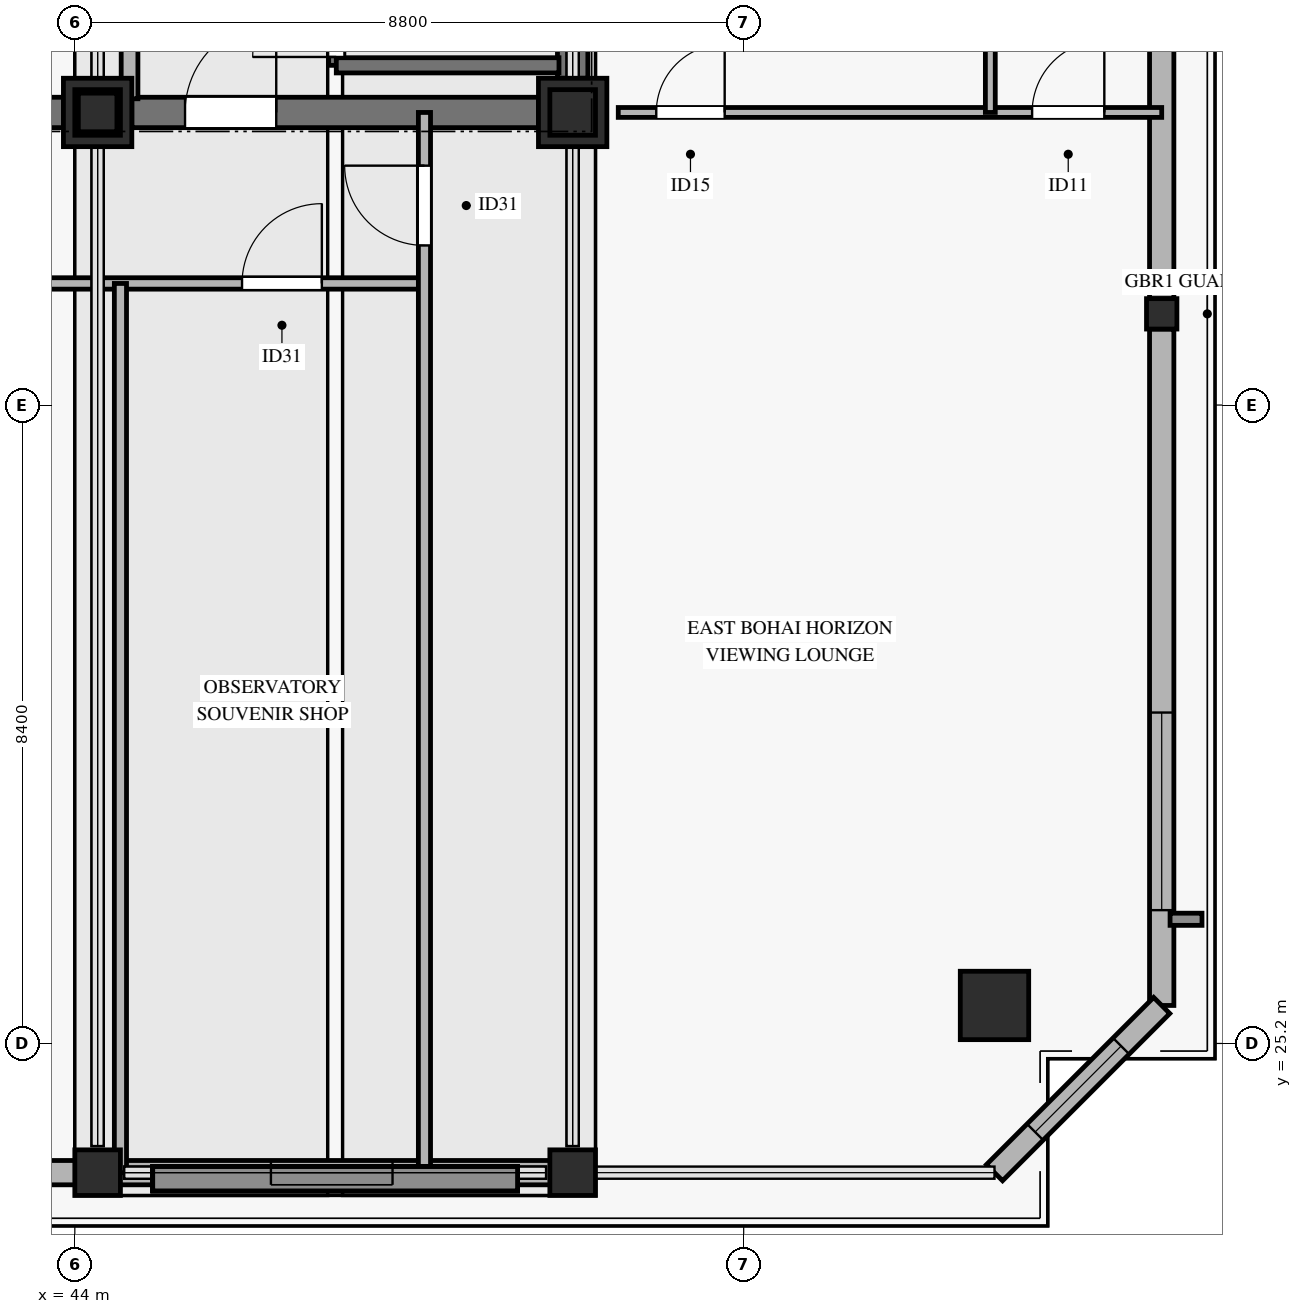
"""IFC4 building model, lengths in metres.
Left out: names, types, materials, properties, quantities, classifications, styles, units other than length and angle.
Written with IfcOpenShell. Run it as: python <this file> out.ifc"""

import sys

from ifc_helpers import new_model, si_unit, direction, frame, frame_2d, origin, origin_2d, place, context, subcontext, project, spatial, rectangle, hollow_rectangle, hollow_circle, extrude, source, transform, mapped, element, fill, save


model = new_model("IFC4")
c1 = context("Model", 3, precision=1e-05, world=origin(), true_north=direction((0.0, 1.0)))
c2 = subcontext(c1, "Body", "Model", "MODEL_VIEW")
j1 = project(units=[si_unit("LENGTHUNIT", "METRE"), si_unit("PLANEANGLEUNIT", "RADIAN")], contexts=[c1])
p1 = place(None, origin())
s1 = spatial("IfcSite", under=j1, at=p1, CompositionType="ELEMENT")
p2 = place(p1, origin())
s2 = spatial("IfcBuilding", under=s1, at=p2, CompositionType="ELEMENT")
p3 = place(p2, frame((0.0, 0.0, 352.7)))
s3 = spatial("IfcBuildingStorey", under=s2, at=p3, CompositionType="ELEMENT", Elevation=352.7)
m1 = source(origin(), c2, "Body", "SweptSolid", [
    extrude(rectangle(XDim=0.9, YDim=0.9, at=origin_2d()), origin(), (0.0, 0.0, 1.0), 6.16),
])
for number, where, z_axis, x_axis in (
    (1, (44.3, 37.45, 0.0), (0.0, 0.0, 1.0), (1.0, 0.0, 0.0)),
    (2, (50.55, 37.45, 0.0), (0.0, 0.0, 1.0), (1.0, 0.0, 0.0)),
):
    element("IfcColumn", number, at=place(p3, frame(where, z_axis=z_axis, x_axis=x_axis)), inside=s3, PredefinedType="PILASTER", context=c2, shape_type="MappedRepresentation", body=[
        mapped(m1, transform((0.0, 0.0, 0.0), x_axis=(1.0, 0.0, 0.0), y_axis=(0.0, 1.0, 0.0), z_axis=(0.0, 0.0, 1.0), scale=1.0)),
    ])
p4 = place(p3, frame((36.05, 37.45, 0.0), z_axis=(0.0, 0.0, 1.0), x_axis=(1.0, 0.0, 0.0)))
e3 = element("IfcWall", 3, at=p4, inside=s3, PredefinedType="SHEAR", context=c2, shape_type="SweptSolid", body=[
    extrude(rectangle(XDim=7.8, YDim=0.4, at=frame_2d((3.9, 0.0))), origin(), (0.0, 0.0, 1.0), 6.16),
])
p5 = place(p3, frame((44.75, 37.45, 0.0), z_axis=(0.0, 0.0, 1.0), x_axis=(1.0, 0.0, 0.0)))
e4 = element("IfcWall", 4, at=p5, inside=s3, PredefinedType="SHEAR", context=c2, shape_type="SweptSolid", body=[
    extrude(rectangle(XDim=5.35, YDim=0.4, at=frame_2d((2.675, 0.0))), origin(), (0.0, 0.0, 1.0), 6.16),
])
p6 = place(p5, frame((0.7, 0.0, 0.0)))
e5 = element("IfcOpeningElement", 5, at=p6, cuts=e4, PredefinedType="OPENING", context=c2, shape_type="SweptSolid", body=[
    extrude(rectangle(XDim=1.2, YDim=2.15, at=frame_2d((0.6, 1.075))), frame((0.0, 0.21, 0.0), z_axis=(0.0, -1.0, 0.0), x_axis=(1.0, 0.0, 0.0)), (0.0, 0.0, 1.0), 0.42),
])
p7 = place(p3, frame((50.55, 37.9, 0.0), z_axis=(0.0, 0.0, 1.0), x_axis=(0.0, 1.0, 0.0)))
e6 = element("IfcWall", 6, at=p7, inside=s3, PredefinedType="SHEAR", context=c2, shape_type="SweptSolid", body=[
    extrude(rectangle(XDim=8.2, YDim=0.4, at=frame_2d((4.1, 0.0))), origin(), (0.0, 0.0, 1.0), 6.16),
])
m2 = source(origin(), c2, "Body", "SweptSolid", [
    extrude(hollow_rectangle(XDim=0.9, YDim=0.9, WallThickness=0.04, at=origin_2d()), origin(), (0.0, 0.0, 1.0), 6.16),
])
p8 = place(p3, frame((56.1, 25.7, 0.0), z_axis=(0.0, 0.0, 1.0), x_axis=(1.0, 0.0, 0.0)))
e7 = element("IfcColumn", 7, at=p8, inside=s3, PredefinedType="COLUMN", context=c2, shape_type="MappedRepresentation", body=[
    mapped(m2, transform((0.0, 0.0, 0.0), x_axis=(1.0, 0.0, 0.0), y_axis=(0.0, 1.0, 0.0), z_axis=(0.0, 0.0, 1.0), scale=1.0)),
])
m3 = source(origin(), c2, "Body", "SweptSolid", [
    extrude(hollow_rectangle(XDim=0.4, YDim=0.4, WallThickness=0.02, at=origin_2d()), origin(), (0.0, 0.0, 1.0), 6.16),
])
for number, where, z_axis, x_axis in (
    (8, (44.3, 23.5, 0.0), (0.0, 0.0, 1.0), (1.0, 0.0, 0.0)),
    (9, (50.55, 23.5, 0.0), (0.0, 0.0, 1.0), (1.0, 0.0, 0.0)),
    (10, (58.3, 34.8, 0.0), (0.0, 0.0, 1.0), (1.0, 0.0, 0.0)),
):
    element("IfcColumn", number, at=place(p3, frame(where, z_axis=z_axis, x_axis=x_axis)), inside=s3, PredefinedType="COLUMN", context=c2, shape_type="MappedRepresentation", body=[
        mapped(m3, transform((0.0, 0.0, 0.0), x_axis=(1.0, 0.0, 0.0), y_axis=(0.0, 1.0, 0.0), z_axis=(0.0, 0.0, 1.0), scale=1.0)),
    ])
m4 = source(origin(), c2, "Body", "SweptSolid", [
    extrude(hollow_rectangle(XDim=0.6, YDim=0.6, WallThickness=0.028, at=origin_2d()), origin(), (0.0, 0.0, 1.0), 32.096),
])
for number, where, z_axis, x_axis in (
    (11, (44.3, 23.5, 6.4), (0.0, 0.0, 1.0), (1.0, 0.0, 0.0)),
    (12, (50.55, 23.5, 6.4), (0.0, 0.0, 1.0), (1.0, 0.0, 0.0)),
    (13, (50.55, 37.45, 6.4), (0.0, 0.0, 1.0), (1.0, 0.0, 0.0)),
    (14, (44.3, 37.45, 6.4), (0.0, 0.0, 1.0), (1.0, 0.0, 0.0)),
):
    element("IfcColumn", number, at=place(p3, frame(where, z_axis=z_axis, x_axis=x_axis)), inside=s3, PredefinedType="COLUMN", context=c2, shape_type="MappedRepresentation", body=[
        mapped(m4, transform((0.0, 0.0, 0.0), x_axis=(1.0, 0.0, 0.0), y_axis=(0.0, 1.0, 0.0), z_axis=(0.0, 0.0, 1.0), scale=1.0)),
    ])
m5 = source(origin(), c2, "Body", "SweptSolid", [
    extrude(hollow_circle(Radius=0.254, WallThickness=0.024, at=origin_2d()), origin(), (0.0, 0.0, 1.0), 1.704),
])
p9 = place(p3, frame((44.3, 37.45, 38.496), z_axis=(0.0, 0.0, 1.0), x_axis=(1.0, 0.0, 0.0)))
e15 = element("IfcColumn", 15, at=p9, inside=s3, PredefinedType="COLUMN", context=c2, shape_type="MappedRepresentation", body=[
    mapped(m5, transform((0.0, 0.0, 0.0), x_axis=(1.0, 0.0, 0.0), y_axis=(0.0, 1.0, 0.0), z_axis=(0.0, 0.0, 1.0), scale=1.0)),
])
p10 = place(p3, frame((37.75, 23.5, 0.0), z_axis=(0.0, 0.0, 1.0), x_axis=(1.0, 0.0, 0.0)))
e16 = element("IfcWall", 16, at=p10, inside=s3, PredefinedType="SOLIDWALL", context=c2, shape_type="SweptSolid", body=[
    extrude(rectangle(XDim=6.35, YDim=0.32, at=frame_2d((3.175, 0.0))), origin(), (0.0, 0.0, 1.0), 3.535),
])
p11 = place(p3, frame((44.5, 23.5, 0.0), z_axis=(0.0, 0.0, 1.0), x_axis=(1.0, 0.0, 0.0)))
e17 = element("IfcWall", 17, at=p11, inside=s3, PredefinedType="SOLIDWALL", context=c2, shape_type="SweptSolid", body=[
    extrude(rectangle(XDim=5.85, YDim=0.32, at=frame_2d((2.925, 0.0))), origin(), (0.0, 0.0, 1.0), 5.79),
])
p12 = place(p11, frame((2.08, 0.0, 0.45)))
e18 = element("IfcOpeningElement", 18, at=p12, cuts=e17, PredefinedType="OPENING", context=c2, shape_type="SweptSolid", body=[
    extrude(rectangle(XDim=1.6, YDim=2.0, at=frame_2d((0.8, 1.0))), frame((0.0, 0.17, 0.0), z_axis=(0.0, -1.0, 0.0), x_axis=(1.0, 0.0, 0.0)), (0.0, 0.0, 1.0), 0.34),
])
p13 = place(p3, frame((58.3, 25.7, 0.0), z_axis=(0.0, 0.0, 1.0), x_axis=(0.0, 1.0, 0.0)))
e19 = element("IfcWall", 19, at=p13, inside=s3, PredefinedType="SOLIDWALL", context=c2, shape_type="SweptSolid", body=[
    extrude(rectangle(XDim=8.9, YDim=0.32, at=frame_2d((4.45, 0.0))), origin(), (0.0, 0.0, 1.0), 5.79),
])
p14 = place(p13, frame((1.254, 0.0, 0.45)))
e20 = element("IfcOpeningElement", 20, at=p14, cuts=e19, PredefinedType="OPENING", context=c2, shape_type="SweptSolid", body=[
    extrude(rectangle(XDim=2.6, YDim=2.4, at=frame_2d((1.3, 1.2))), frame((0.0, 0.17, 0.0), z_axis=(0.0, -1.0, 0.0), x_axis=(1.0, 0.0, 0.0)), (0.0, 0.0, 1.0), 0.34),
])
p15 = place(p3, frame((58.3, 35.0, 0.0), z_axis=(0.0, 0.0, 1.0), x_axis=(0.0, 1.0, 0.0)))
e21 = element("IfcWall", 21, at=p15, inside=s3, PredefinedType="SOLIDWALL", context=c2, shape_type="SweptSolid", body=[
    extrude(rectangle(XDim=8.9, YDim=0.32, at=frame_2d((4.45, 0.0))), origin(), (0.0, 0.0, 1.0), 5.79),
])
p16 = place(p3, frame((56.1, 23.5, 0.0), z_axis=(0.0, 0.0, 1.0), x_axis=(0.707106781187, 0.707106781187, 0.0)))
e22 = element("IfcWall", 22, at=p16, inside=s3, PredefinedType="SOLIDWALL", context=c2, shape_type="SweptSolid", body=[
    extrude(rectangle(XDim=3.111, YDim=0.3, at=frame_2d((1.556, 0.0))), origin(), (0.0, 0.0, 1.0), 5.79),
])
p17 = place(p16, frame((0.756, 0.0, 0.45)))
e23 = element("IfcOpeningElement", 23, at=p17, cuts=e22, PredefinedType="OPENING", context=c2, shape_type="SweptSolid", body=[
    extrude(rectangle(XDim=1.6, YDim=2.0, at=frame_2d((0.8, 1.0))), frame((0.0, 0.16, 0.0), z_axis=(0.0, -1.0, 0.0), x_axis=(1.0, 0.0, 0.0)), (0.0, 0.0, 1.0), 0.32),
])
p18 = place(p3, frame((47.44, 38.07, 0.0), z_axis=(0.0, 0.0, 1.0), x_axis=(0.0, 1.0, 0.0)))
e24 = element("IfcWall", 24, at=p18, inside=s3, PredefinedType="SOLIDWALL", context=c2, shape_type="SweptSolid", body=[
    extrude(rectangle(XDim=7.25, YDim=0.2, at=frame_2d((3.625, 0.0))), origin(), (0.0, 0.0, 1.0), 6.4),
])
p19 = place(p18, frame((0.11, 0.0, 0.0)))
e25 = element("IfcOpeningElement", 25, at=p19, cuts=e24, PredefinedType="OPENING", context=c2, shape_type="SweptSolid", body=[
    extrude(rectangle(XDim=1.1, YDim=2.15, at=frame_2d((0.55, 1.075))), frame((0.0, 0.11, 0.0), z_axis=(0.0, -1.0, 0.0), x_axis=(1.0, 0.0, 0.0)), (0.0, 0.0, 1.0), 0.22),
])
p20 = place(p3, frame((47.44, 38.07, 0.0), z_axis=(0.0, 0.0, 1.0), x_axis=(1.0, 0.0, 0.0)))
e26 = element("IfcWall", 26, at=p20, inside=s3, PredefinedType="SOLIDWALL", context=c2, shape_type="SweptSolid", body=[
    extrude(rectangle(XDim=2.93, YDim=0.2, at=frame_2d((1.465, 0.0))), origin(), (0.0, 0.0, 1.0), 6.4),
])
p21 = place(p3, frame((44.72, 37.63, 0.0), z_axis=(0.0, 0.0, 1.0), x_axis=(0.0, 1.0, 0.0)))
e27 = element("IfcWall", 27, at=p21, inside=s3, PredefinedType="SOLIDWALL", context=c2, shape_type="SweptSolid", body=[
    extrude(rectangle(XDim=7.59, YDim=0.22, at=frame_2d((3.795, 0.0))), origin(), (0.0, 0.0, 1.0), 6.16),
])
p22 = place(p3, frame((22.6, 35.2, 0.0), z_axis=(0.0, 0.0, 1.0), x_axis=(1.0, 0.0, 0.0)))
e28 = element("IfcWall", 28, at=p22, inside=s3, PredefinedType="PARTITIONING", context=c2, shape_type="SweptSolid", body=[
    extrude(rectangle(XDim=26.0, YDim=0.15, at=frame_2d((13.0, 0.0))), origin(), (0.0, 0.0, 1.0), 3.535),
])
p23 = place(p22, frame((3.28, 0.0, 0.0)))
e29 = element("IfcOpeningElement", 29, at=p23, cuts=e28, PredefinedType="OPENING", context=c2, shape_type="SweptSolid", body=[
    extrude(rectangle(XDim=1.05, YDim=2.15, at=frame_2d((0.525, 1.075))), frame((0.0, 0.085, 0.0), z_axis=(0.0, -1.0, 0.0), x_axis=(1.0, 0.0, 0.0)), (0.0, 0.0, 1.0), 0.17),
])
p24 = place(p22, frame((11.94, 0.0, 0.0)))
e30 = element("IfcOpeningElement", 30, at=p24, cuts=e28, PredefinedType="OPENING", context=c2, shape_type="SweptSolid", body=[
    extrude(rectangle(XDim=1.05, YDim=2.15, at=frame_2d((0.525, 1.075))), frame((0.0, 0.085, 0.0), z_axis=(0.0, -1.0, 0.0), x_axis=(1.0, 0.0, 0.0)), (0.0, 0.0, 1.0), 0.17),
])
p25 = place(p22, frame((19.08, 0.0, 0.0)))
e31 = element("IfcOpeningElement", 31, at=p25, cuts=e28, PredefinedType="OPENING", context=c2, shape_type="SweptSolid", body=[
    extrude(rectangle(XDim=1.05, YDim=2.15, at=frame_2d((0.525, 1.075))), frame((0.0, 0.085, 0.0), z_axis=(0.0, -1.0, 0.0), x_axis=(1.0, 0.0, 0.0)), (0.0, 0.0, 1.0), 0.17),
])
p26 = place(p22, frame((23.6, 0.0, 0.0)))
e32 = element("IfcOpeningElement", 32, at=p26, cuts=e28, PredefinedType="OPENING", context=c2, shape_type="SweptSolid", body=[
    extrude(rectangle(XDim=1.05, YDim=2.15, at=frame_2d((0.525, 1.075))), frame((0.0, 0.085, 0.0), z_axis=(0.0, -1.0, 0.0), x_axis=(1.0, 0.0, 0.0)), (0.0, 0.0, 1.0), 0.17),
])
p27 = place(p3, frame((48.6, 23.5, 0.0), z_axis=(0.0, 0.0, 1.0), x_axis=(0.0, 1.0, 0.0)))
e33 = element("IfcWall", 33, at=p27, inside=s3, PredefinedType="PARTITIONING", context=c2, shape_type="SweptSolid", body=[
    extrude(rectangle(XDim=13.95, YDim=0.16, at=frame_2d((6.975, 0.0))), origin(), (0.0, 0.0, 1.0), 5.745),
])
p28 = place(p27, frame((12.2, 0.0, 0.0)))
e34 = element("IfcOpeningElement", 34, at=p28, cuts=e33, PredefinedType="OPENING", context=c2, shape_type="SweptSolid", body=[
    extrude(rectangle(XDim=1.05, YDim=2.15, at=frame_2d((0.525, 1.075))), frame((0.0, 0.09, 0.0), z_axis=(0.0, -1.0, 0.0), x_axis=(1.0, 0.0, 0.0)), (0.0, 0.0, 1.0), 0.18),
])
p29 = place(p3, frame((44.6, 23.5, 0.0), z_axis=(0.0, 0.0, 1.0), x_axis=(0.0, 1.0, 0.0)))
e35 = element("IfcWall", 35, at=p29, inside=s3, PredefinedType="PARTITIONING", context=c2, shape_type="SweptSolid", body=[
    extrude(rectangle(XDim=11.7, YDim=0.16, at=frame_2d((5.85, 0.0))), origin(), (0.0, 0.0, 1.0), 3.535),
])
p30 = place(p3, frame((51.15, 37.45, 0.0), z_axis=(0.0, 0.0, 1.0), x_axis=(1.0, 0.0, 0.0)))
e36 = element("IfcWall", 36, at=p30, inside=s3, PredefinedType="PARTITIONING", context=c2, shape_type="SweptSolid", body=[
    extrude(rectangle(XDim=7.15, YDim=0.13, at=frame_2d((3.575, 0.0))), origin(), (0.0, 0.0, 1.0), 5.795),
])
p31 = place(p30, frame((0.5, 0.0, 0.0)))
e37 = element("IfcOpeningElement", 37, at=p31, cuts=e36, PredefinedType="OPENING", context=c2, shape_type="SweptSolid", body=[
    extrude(rectangle(XDim=0.9, YDim=2.1, at=frame_2d((0.45, 1.05))), frame((0.0, 0.075, 0.0), z_axis=(0.0, -1.0, 0.0), x_axis=(1.0, 0.0, 0.0)), (0.0, 0.0, 1.0), 0.15),
])
p32 = place(p30, frame((5.445, 0.0, 0.0)))
e38 = element("IfcOpeningElement", 38, at=p32, cuts=e36, PredefinedType="OPENING", context=c2, shape_type="SweptSolid", body=[
    extrude(rectangle(XDim=0.95, YDim=2.1, at=frame_2d((0.475, 1.05))), frame((0.0, 0.075, 0.0), z_axis=(0.0, -1.0, 0.0), x_axis=(1.0, 0.0, 0.0)), (0.0, 0.0, 1.0), 0.15),
])
p33 = place(p3, frame((56.045, 37.45, 0.0), z_axis=(0.0, 0.0, 1.0), x_axis=(0.0, 1.0, 0.0)))
e39 = element("IfcWall", 39, at=p33, inside=s3, PredefinedType="PARTITIONING", context=c2, shape_type="SweptSolid", body=[
    extrude(rectangle(XDim=8.8, YDim=0.13, at=frame_2d((4.4, 0.0))), origin(), (0.0, 0.0, 1.0), 5.795),
])
m6 = source(origin(), c2, "Body", "SweptSolid", [
    extrude(rectangle(XDim=1.6, YDim=2.0, at=frame_2d((0.8, 1.0))), frame((0.0, 0.03, 0.0), z_axis=(0.0, -1.0, 0.0), x_axis=(1.0, 0.0, 0.0)), (0.0, 0.0, 1.0), 0.06),
])
p34 = place(p12, origin())
e40 = element("IfcWindow", 40, at=p34, inside=s3, PartitioningType="SINGLE_PANEL", PredefinedType="WINDOW", context=c2, shape_type="MappedRepresentation", body=[
    mapped(m6, transform((0.0, 0.0, 0.0), x_axis=(1.0, 0.0, 0.0), y_axis=(0.0, 1.0, 0.0), z_axis=(0.0, 0.0, 1.0), scale=1.0)),
])
fill(e18, e40)
m7 = source(origin(), c2, "Body", "SweptSolid", [
    extrude(rectangle(XDim=2.6, YDim=2.4, at=frame_2d((1.3, 1.2))), frame((0.0, 0.03, 0.0), z_axis=(0.0, -1.0, 0.0), x_axis=(1.0, 0.0, 0.0)), (0.0, 0.0, 1.0), 0.06),
])
p35 = place(p14, origin())
e41 = element("IfcWindow", 41, at=p35, inside=s3, PartitioningType="SINGLE_PANEL", PredefinedType="WINDOW", context=c2, shape_type="MappedRepresentation", body=[
    mapped(m7, transform((0.0, 0.0, 0.0), x_axis=(1.0, 0.0, 0.0), y_axis=(0.0, 1.0, 0.0), z_axis=(0.0, 0.0, 1.0), scale=1.0)),
])
fill(e20, e41)
p36 = place(p17, origin())
e42 = element("IfcWindow", 42, at=p36, inside=s3, PartitioningType="SINGLE_PANEL", PredefinedType="WINDOW", context=c2, shape_type="MappedRepresentation", body=[
    mapped(m6, transform((0.0, 0.0, 0.0), x_axis=(1.0, 0.0, 0.0), y_axis=(0.0, 1.0, 0.0), z_axis=(0.0, 0.0, 1.0), scale=1.0)),
])
fill(e23, e42)
m8 = source(origin(), c2, "Body", "SweptSolid", [
    extrude(rectangle(XDim=1.1, YDim=2.15, at=frame_2d((0.55, 1.075))), frame((0.0, 0.025, 0.0), z_axis=(0.0, -1.0, 0.0), x_axis=(1.0, 0.0, 0.0)), (0.0, 0.0, 1.0), 0.05),
])
p37 = place(p19, origin())
e43 = element("IfcDoor", 43, at=p37, inside=s3, OperationType="SINGLE_SWING_LEFT", PredefinedType="DOOR", context=c2, shape_type="MappedRepresentation", body=[
    mapped(m8, transform((0.0, 0.0, 0.0), x_axis=(1.0, 0.0, 0.0), y_axis=(0.0, 1.0, 0.0), z_axis=(0.0, 0.0, 1.0), scale=1.0)),
])
fill(e25, e43)
m9 = source(origin(), c2, "Body", "SweptSolid", [
    extrude(rectangle(XDim=1.2, YDim=2.15, at=frame_2d((0.6, 1.075))), frame((0.0, 0.025, 0.0), z_axis=(0.0, -1.0, 0.0), x_axis=(1.0, 0.0, 0.0)), (0.0, 0.0, 1.0), 0.05),
])
p38 = place(p6, origin())
e44 = element("IfcDoor", 44, at=p38, inside=s3, OperationType="SINGLE_SWING_RIGHT", PredefinedType="DOOR", context=c2, shape_type="MappedRepresentation", body=[
    mapped(m9, transform((0.0, 0.0, 0.0), x_axis=(1.0, 0.0, 0.0), y_axis=(0.0, 1.0, 0.0), z_axis=(0.0, 0.0, 1.0), scale=1.0)),
])
fill(e5, e44)
m10 = source(origin(), c2, "Body", "SweptSolid", [
    extrude(rectangle(XDim=1.05, YDim=2.15, at=frame_2d((0.525, 1.075))), frame((0.0, 0.025, 0.0), z_axis=(0.0, -1.0, 0.0), x_axis=(1.0, 0.0, 0.0)), (0.0, 0.0, 1.0), 0.05),
])
p39 = place(p28, origin())
e45 = element("IfcDoor", 45, at=p39, inside=s3, OperationType="SINGLE_SWING_RIGHT", PredefinedType="DOOR", context=c2, shape_type="MappedRepresentation", body=[
    mapped(m10, transform((0.0, 0.0, 0.0), x_axis=(1.0, 0.0, 0.0), y_axis=(0.0, 1.0, 0.0), z_axis=(0.0, 0.0, 1.0), scale=1.0)),
])
fill(e34, e45)
p40 = place(p26, origin())
e46 = element("IfcDoor", 46, at=p40, inside=s3, OperationType="SINGLE_SWING_RIGHT", PredefinedType="DOOR", context=c2, shape_type="MappedRepresentation", body=[
    mapped(m10, transform((0.0, 0.0, 0.0), x_axis=(1.0, 0.0, 0.0), y_axis=(0.0, 1.0, 0.0), z_axis=(0.0, 0.0, 1.0), scale=1.0)),
])
fill(e32, e46)
m11 = source(origin(), c2, "Body", "SweptSolid", [
    extrude(rectangle(XDim=0.9, YDim=2.1, at=frame_2d((0.45, 1.05))), frame((0.0, 0.025, 0.0), z_axis=(0.0, -1.0, 0.0), x_axis=(1.0, 0.0, 0.0)), (0.0, 0.0, 1.0), 0.05),
])
p41 = place(p31, origin())
e47 = element("IfcDoor", 47, at=p41, inside=s3, OperationType="SINGLE_SWING_RIGHT", PredefinedType="DOOR", context=c2, shape_type="MappedRepresentation", body=[
    mapped(m11, transform((0.0, 0.0, 0.0), x_axis=(1.0, 0.0, 0.0), y_axis=(0.0, 1.0, 0.0), z_axis=(0.0, 0.0, 1.0), scale=1.0)),
])
fill(e37, e47)
m12 = source(origin(), c2, "Body", "SweptSolid", [
    extrude(rectangle(XDim=0.95, YDim=2.1, at=frame_2d((0.475, 1.05))), frame((0.0, 0.025, 0.0), z_axis=(0.0, -1.0, 0.0), x_axis=(1.0, 0.0, 0.0)), (0.0, 0.0, 1.0), 0.05),
])
p42 = place(p32, origin())
e48 = element("IfcDoor", 48, at=p42, inside=s3, OperationType="SINGLE_SWING_RIGHT", PredefinedType="DOOR", context=c2, shape_type="MappedRepresentation", body=[
    mapped(m12, transform((0.0, 0.0, 0.0), x_axis=(1.0, 0.0, 0.0), y_axis=(0.0, 1.0, 0.0), z_axis=(0.0, 0.0, 1.0), scale=1.0)),
])
fill(e38, e48)
save(model, sys.argv[1])
